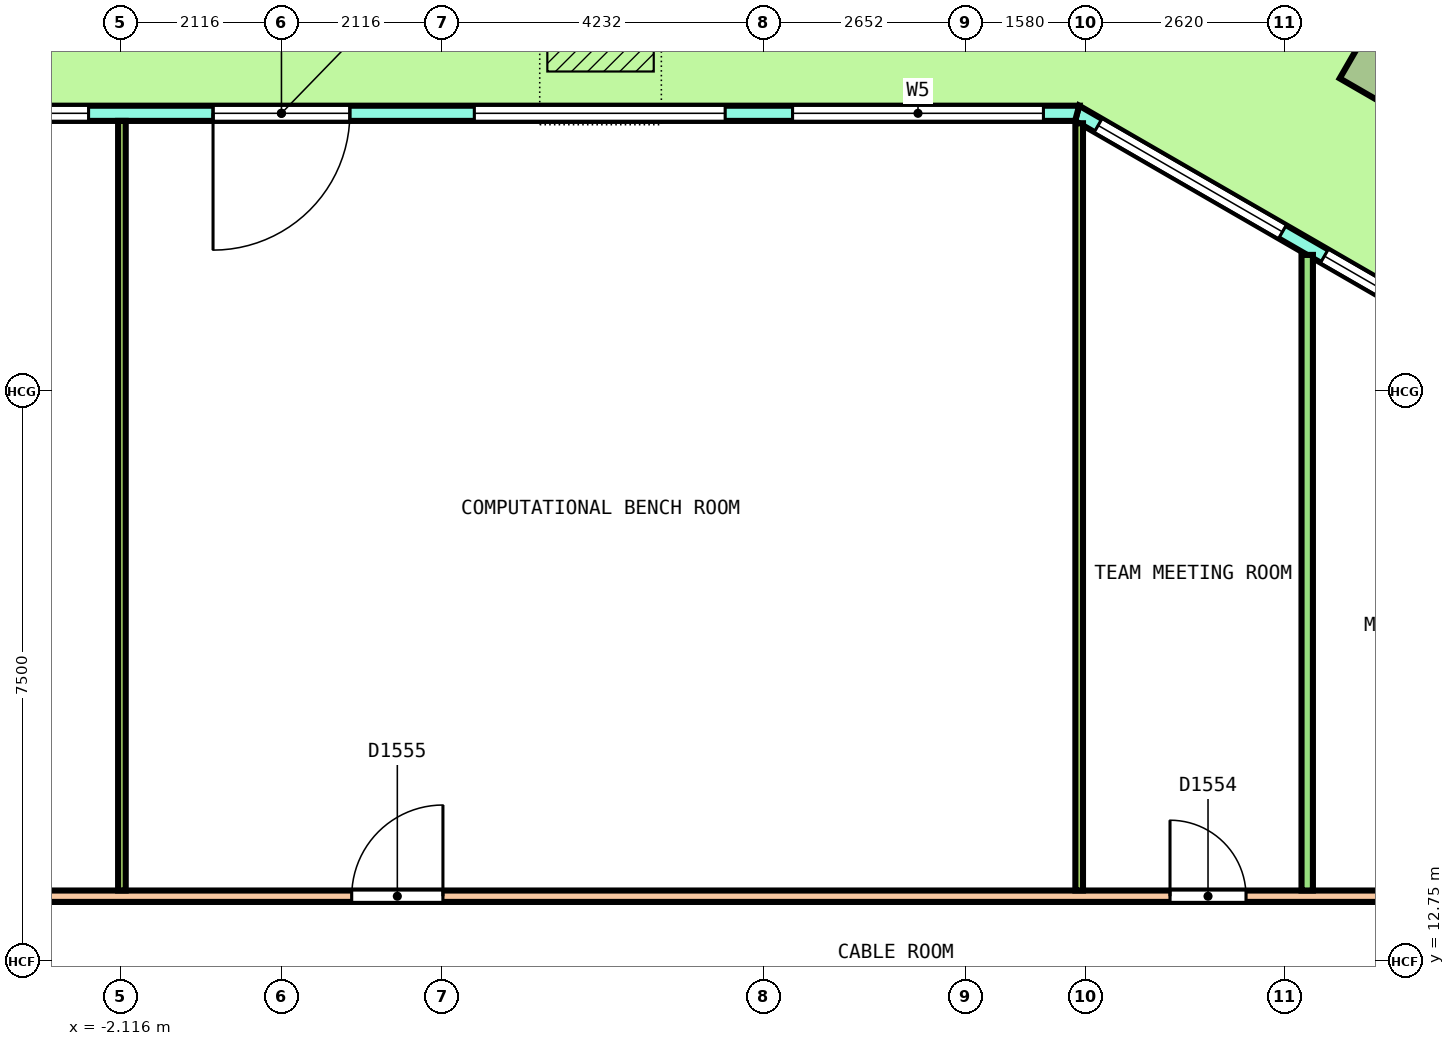
"""IFC4 building model, lengths in metres.
Left out: names, types, materials, properties, quantities, classifications, styles, units other than length and angle.
Written with IfcOpenShell. Run it as: python <this file> out.ifc"""

import sys

from ifc_helpers import new_model, si_unit, direction, frame, frame_2d, origin, origin_2d, place, context, subcontext, project, spatial, polyline, rectangle, outline, extrude, element, fill, save


model = new_model("IFC4")
c1 = context("Model", 3, precision=1e-05, world=origin(), true_north=direction((0.0, 1.0)))
c2 = subcontext(c1, "Body", "Model", "MODEL_VIEW")
j1 = project(units=[si_unit("LENGTHUNIT", "METRE"), si_unit("PLANEANGLEUNIT", "RADIAN")], contexts=[c1])
p1 = place(None, origin())
s1 = spatial("IfcSite", under=j1, at=p1, CompositionType="ELEMENT")
p2 = place(p1, origin())
s2 = spatial("IfcBuilding", under=s1, at=p2, CompositionType="ELEMENT")
p3 = place(p2, frame((0.0, 0.0, 98.4)))
s3 = spatial("IfcBuildingStorey", under=s2, at=p3, CompositionType="ELEMENT", Elevation=98.4)
p4 = place(p3, frame((14.845, 24.606, 0.0), z_axis=(0.036205074038, 0.0, 0.999344381389), x_axis=(-0.865315435316, 0.500246354177, 0.031349362627)))
e1 = element("IfcColumn", 1, at=p4, inside=s3, PredefinedType="COLUMN", context=c2, shape_type="SweptSolid", body=[
    extrude(rectangle(XDim=1.35, YDim=1.35, at=origin_2d()), origin(), (0.0, 0.0, 1.0), 4.053),
])
p5 = place(p3, frame((16.422, 20.463, 0.0), z_axis=(0.0, 0.0, 1.0), x_axis=(-0.866029458321, 0.49999297727, 0.0)))
e2 = element("IfcWall", 2, at=p5, inside=s3, PredefinedType="SOLIDWALL", context=c2, shape_type="SweptSolid", body=[
    extrude(outline(polyline([(-0.027, -0.1), (1.128, -0.1), (2.282, -0.1), (3.437, -0.1), (4.592, -0.1), (5.747, -0.1), (6.901, -0.1), (6.848, 0.1), (5.711, 0.1), (4.574, 0.1), (3.437, 0.1), (2.301, 0.1), (1.164, 0.1), (0.027, 0.1), (-0.027, -0.1)])), origin(), (0.0, 0.0, 1.0), 4.1),
])
p6 = place(p5, frame((0.319, 0.0, 0.1)))
e3 = element("IfcOpeningElement", 3, at=p6, cuts=e2, PredefinedType="OPENING", context=c2, shape_type="SweptSolid", body=[
    extrude(rectangle(XDim=2.8, YDim=2.9, at=frame_2d((1.4, 1.45))), frame((0.0, 0.11, 0.0), z_axis=(0.0, -1.0, 0.0), x_axis=(1.0, 0.0, 0.0)), (0.0, 0.0, 1.0), 0.22),
])
p7 = place(p5, frame((3.756, 0.0, 0.1)))
e4 = element("IfcOpeningElement", 4, at=p7, cuts=e2, PredefinedType="OPENING", context=c2, shape_type="SweptSolid", body=[
    extrude(rectangle(XDim=2.8, YDim=2.9, at=frame_2d((1.4, 1.45))), frame((0.0, 0.11, 0.0), z_axis=(0.0, -1.0, 0.0), x_axis=(1.0, 0.0, 0.0)), (0.0, 0.0, 1.0), 0.22),
])
p8 = place(p3, frame((10.468, 23.9, 0.0), z_axis=(0.0, 0.0, 1.0), x_axis=(-1.0, 0.0, 0.0)))
e5 = element("IfcWall", 5, at=p8, inside=s3, PredefinedType="SOLIDWALL", context=c2, shape_type="SweptSolid", body=[
    extrude(outline(polyline([(-0.027, -0.1), (1.023, -0.1), (2.072, -0.1), (3.122, -0.1), (4.171, -0.1), (5.221, -0.1), (6.27, -0.1), (7.32, -0.1), (8.369, -0.1), (9.419, -0.1), (10.468, -0.1), (11.518, -0.1), (12.567, -0.1), (13.617, -0.1), (14.666, -0.1), (15.716, -0.1), (16.765, -0.1), (17.815, -0.1), (18.864, -0.1), (19.914, -0.1), (20.963, -0.1), (20.91, 0.1), (19.865, 0.1), (18.821, 0.1), (17.777, 0.1), (16.733, 0.1), (15.689, 0.1), (14.645, 0.1), (13.601, 0.1), (12.557, 0.1), (11.512, 0.1), (10.468, 0.1), (9.424, 0.1), (8.38, 0.1), (7.336, 0.1), (6.292, 0.1), (5.248, 0.1), (4.203, 0.1), (3.159, 0.1), (2.115, 0.1), (1.071, 0.1), (0.027, 0.1), (-0.027, -0.1)])), origin(), (0.0, 0.0, 1.0), 4.1),
])
p9 = place(p8, frame((0.444, 0.0, 0.1)))
e6 = element("IfcOpeningElement", 6, at=p9, cuts=e5, PredefinedType="OPENING", context=c2, shape_type="SweptSolid", body=[
    extrude(rectangle(XDim=3.3, YDim=2.9, at=frame_2d((1.65, 1.45))), frame((0.0, 0.11, 0.0), z_axis=(0.0, -1.0, 0.0), x_axis=(1.0, 0.0, 0.0)), (0.0, 0.0, 1.0), 0.22),
])
p10 = place(p8, frame((4.631, 0.0, 0.1)))
e7 = element("IfcOpeningElement", 7, at=p10, cuts=e5, PredefinedType="OPENING", context=c2, shape_type="SweptSolid", body=[
    extrude(rectangle(XDim=3.3, YDim=2.9, at=frame_2d((1.65, 1.45))), frame((0.0, 0.11, 0.0), z_axis=(0.0, -1.0, 0.0), x_axis=(1.0, 0.0, 0.0)), (0.0, 0.0, 1.0), 0.22),
])
p11 = place(p8, frame((9.568, 0.0, 0.0)))
e8 = element("IfcOpeningElement", 8, at=p11, cuts=e5, PredefinedType="OPENING", context=c2, shape_type="SweptSolid", body=[
    extrude(rectangle(XDim=1.8, YDim=2.4, at=frame_2d((0.9, 1.2))), frame((0.0, 0.11, 0.0), z_axis=(0.0, -1.0, 0.0), x_axis=(1.0, 0.0, 0.0)), (0.0, 0.0, 1.0), 0.22),
])
p12 = place(p8, frame((9.568, 0.0, 2.55)))
e9 = element("IfcOpeningElement", 9, at=p12, cuts=e5, PredefinedType="OPENING", context=c2, shape_type="SweptSolid", body=[
    extrude(rectangle(XDim=1.8, YDim=0.45, at=frame_2d((0.9, 0.225))), frame((0.0, 0.11, 0.0), z_axis=(0.0, -1.0, 0.0), x_axis=(1.0, 0.0, 0.0)), (0.0, 0.0, 1.0), 0.22),
])
p13 = place(p8, frame((13.006, 0.0, 0.1)))
e10 = element("IfcOpeningElement", 10, at=p13, cuts=e5, PredefinedType="OPENING", context=c2, shape_type="SweptSolid", body=[
    extrude(rectangle(XDim=3.3, YDim=2.9, at=frame_2d((1.65, 1.45))), frame((0.0, 0.11, 0.0), z_axis=(0.0, -1.0, 0.0), x_axis=(1.0, 0.0, 0.0)), (0.0, 0.0, 1.0), 0.22),
])
p14 = place(p8, frame((17.193, 0.0, 0.1)))
e11 = element("IfcOpeningElement", 11, at=p14, cuts=e5, PredefinedType="OPENING", context=c2, shape_type="SweptSolid", body=[
    extrude(rectangle(XDim=3.3, YDim=2.9, at=frame_2d((1.65, 1.45))), frame((0.0, 0.11, 0.0), z_axis=(0.0, -1.0, 0.0), x_axis=(1.0, 0.0, 0.0)), (0.0, 0.0, 1.0), 0.22),
])
p15 = place(p3, frame((-15.925, 13.6, 0.0), z_axis=(0.0, 0.0, 1.0), x_axis=(1.0, 0.0, 0.0)))
e12 = element("IfcWall", 12, at=p15, inside=s3, PredefinedType="PARTITIONING", context=c2, shape_type="SweptSolid", body=[
    extrude(rectangle(XDim=31.85, YDim=0.15, at=frame_2d((15.925, 0.0))), origin(), (0.0, 0.0, 1.0), 3.05),
])
p16 = place(p15, frame((30.374, 0.0, 0.0)))
e13 = element("IfcOpeningElement", 13, at=p16, cuts=e12, PredefinedType="OPENING", context=c2, shape_type="SweptSolid", body=[
    extrude(rectangle(XDim=1.0, YDim=2.1, at=frame_2d((0.5, 1.05))), frame((0.0, 0.085, 0.0), z_axis=(0.0, -1.0, 0.0), x_axis=(1.0, 0.0, 0.0)), (0.0, 0.0, 1.0), 0.17),
])
p17 = place(p15, frame((27.615, 0.0, 0.0)))
e14 = element("IfcOpeningElement", 14, at=p17, cuts=e12, PredefinedType="OPENING", context=c2, shape_type="SweptSolid", body=[
    extrude(rectangle(XDim=1.0, YDim=2.1, at=frame_2d((0.5, 1.05))), frame((0.0, 0.085, 0.0), z_axis=(0.0, -1.0, 0.0), x_axis=(1.0, 0.0, 0.0)), (0.0, 0.0, 1.0), 0.17),
])
p18 = place(p15, frame((16.85, 0.0, 0.0)))
e15 = element("IfcOpeningElement", 15, at=p18, cuts=e12, PredefinedType="OPENING", context=c2, shape_type="SweptSolid", body=[
    extrude(rectangle(XDim=1.2, YDim=2.1, at=frame_2d((0.6, 1.05))), frame((0.0, 0.085, 0.0), z_axis=(0.0, -1.0, 0.0), x_axis=(1.0, 0.0, 0.0)), (0.0, 0.0, 1.0), 0.17),
])
p19 = place(p15, frame((10.802, 0.0, 0.0)))
e16 = element("IfcOpeningElement", 16, at=p19, cuts=e12, PredefinedType="OPENING", context=c2, shape_type="SweptSolid", body=[
    extrude(rectangle(XDim=1.0, YDim=2.1, at=frame_2d((0.5, 1.05))), frame((0.0, 0.085, 0.0), z_axis=(0.0, -1.0, 0.0), x_axis=(1.0, 0.0, 0.0)), (0.0, 0.0, 1.0), 0.17),
])
p20 = place(p15, frame((3.235, 0.0, 0.0)))
e17 = element("IfcOpeningElement", 17, at=p20, cuts=e12, PredefinedType="OPENING", context=c2, shape_type="SweptSolid", body=[
    extrude(rectangle(XDim=1.0, YDim=2.1, at=frame_2d((0.5, 1.05))), frame((0.0, 0.085, 0.0), z_axis=(0.0, -1.0, 0.0), x_axis=(1.0, 0.0, 0.0)), (0.0, 0.0, 1.0), 0.17),
])
p21 = place(p15, frame((0.879, 0.0, 0.0)))
e18 = element("IfcOpeningElement", 18, at=p21, cuts=e12, PredefinedType="OPENING", context=c2, shape_type="SweptSolid", body=[
    extrude(rectangle(XDim=1.0, YDim=2.1, at=frame_2d((0.5, 1.05))), frame((0.0, 0.085, 0.0), z_axis=(0.0, -1.0, 0.0), x_axis=(1.0, 0.0, 0.0)), (0.0, 0.0, 1.0), 0.17),
])
p22 = place(p3, frame((13.495, 13.675, 0.0), z_axis=(0.0, 0.0, 1.0), x_axis=(0.0, 1.0, 0.0)))
e19 = element("IfcWall", 19, at=p22, inside=s3, PredefinedType="PARTITIONING", context=c2, shape_type="SweptSolid", body=[
    extrude(rectangle(XDim=8.362, YDim=0.15, at=frame_2d((4.181, 0.0))), origin(), (0.0, 0.0, 1.0), 3.05),
])
p23 = place(p3, frame((10.495, 13.675, 0.0), z_axis=(0.0, 0.0, 1.0), x_axis=(0.0, 1.0, 0.0)))
e20 = element("IfcWall", 20, at=p23, inside=s3, PredefinedType="PARTITIONING", context=c2, shape_type="SweptSolid", body=[
    extrude(rectangle(XDim=10.094, YDim=0.1, at=frame_2d((5.047, 0.0))), origin(), (0.0, 0.0, 1.0), 3.05),
])
p24 = place(p3, frame((-2.099, 13.675, 0.0), z_axis=(0.0, 0.0, 1.0), x_axis=(0.0, 1.0, 0.0)))
e21 = element("IfcWall", 21, at=p24, inside=s3, PredefinedType="PARTITIONING", context=c2, shape_type="SweptSolid", body=[
    extrude(rectangle(XDim=10.125, YDim=0.1, at=frame_2d((5.062, 0.0))), origin(), (0.0, 0.0, 1.0), 3.05),
])
p25 = place(p6, origin())
e22 = element("IfcWindow", 22, at=p25, inside=s3, PartitioningType="SINGLE_PANEL", PredefinedType="WINDOW", context=c2, shape_type="SweptSolid", body=[
    extrude(rectangle(XDim=2.8, YDim=2.9, at=frame_2d((1.4, 1.45))), frame((0.0, 0.03, 0.0), z_axis=(0.0, -1.0, 0.0), x_axis=(1.0, 0.0, 0.0)), (0.0, 0.0, 1.0), 0.06),
])
fill(e3, e22)
p26 = place(p7, origin())
e23 = element("IfcWindow", 23, at=p26, inside=s3, PartitioningType="SINGLE_PANEL", PredefinedType="WINDOW", context=c2, shape_type="SweptSolid", body=[
    extrude(rectangle(XDim=2.8, YDim=2.9, at=frame_2d((1.4, 1.45))), frame((0.0, 0.03, 0.0), z_axis=(0.0, -1.0, 0.0), x_axis=(1.0, 0.0, 0.0)), (0.0, 0.0, 1.0), 0.06),
])
fill(e4, e23)
p27 = place(p9, origin())
e24 = element("IfcWindow", 24, at=p27, inside=s3, PartitioningType="SINGLE_PANEL", PredefinedType="WINDOW", context=c2, shape_type="SweptSolid", body=[
    extrude(rectangle(XDim=3.3, YDim=2.9, at=frame_2d((1.65, 1.45))), frame((0.0, 0.03, 0.0), z_axis=(0.0, -1.0, 0.0), x_axis=(1.0, 0.0, 0.0)), (0.0, 0.0, 1.0), 0.06),
])
fill(e6, e24)
p28 = place(p10, origin())
e25 = element("IfcWindow", 25, at=p28, inside=s3, PartitioningType="SINGLE_PANEL", PredefinedType="WINDOW", context=c2, shape_type="SweptSolid", body=[
    extrude(rectangle(XDim=3.3, YDim=2.9, at=frame_2d((1.65, 1.45))), frame((0.0, 0.03, 0.0), z_axis=(0.0, -1.0, 0.0), x_axis=(1.0, 0.0, 0.0)), (0.0, 0.0, 1.0), 0.06),
])
fill(e7, e25)
p29 = place(p11, origin())
e26 = element("IfcDoor", 26, at=p29, inside=s3, OperationType="DOUBLE_DOOR_SINGLE_SWING", PredefinedType="DOOR", context=c2, shape_type="SweptSolid", body=[
    extrude(rectangle(XDim=1.8, YDim=2.4, at=frame_2d((0.9, 1.2))), frame((0.0, 0.025, 0.0), z_axis=(0.0, -1.0, 0.0), x_axis=(1.0, 0.0, 0.0)), (0.0, 0.0, 1.0), 0.05),
])
fill(e8, e26)
p30 = place(p12, origin())
e27 = element("IfcWindow", 27, at=p30, inside=s3, PartitioningType="SINGLE_PANEL", PredefinedType="WINDOW", context=c2, shape_type="SweptSolid", body=[
    extrude(rectangle(XDim=1.8, YDim=0.45, at=frame_2d((0.9, 0.225))), frame((0.0, 0.03, 0.0), z_axis=(0.0, -1.0, 0.0), x_axis=(1.0, 0.0, 0.0)), (0.0, 0.0, 1.0), 0.06),
])
fill(e9, e27)
p31 = place(p13, origin())
e28 = element("IfcWindow", 28, at=p31, inside=s3, PartitioningType="SINGLE_PANEL", PredefinedType="WINDOW", context=c2, shape_type="SweptSolid", body=[
    extrude(rectangle(XDim=3.3, YDim=2.9, at=frame_2d((1.65, 1.45))), frame((0.0, 0.03, 0.0), z_axis=(0.0, -1.0, 0.0), x_axis=(1.0, 0.0, 0.0)), (0.0, 0.0, 1.0), 0.06),
])
fill(e10, e28)
p32 = place(p17, origin())
e29 = element("IfcDoor", 29, at=p32, inside=s3, OperationType="SINGLE_SWING_RIGHT", PredefinedType="DOOR", context=c2, shape_type="SweptSolid", body=[
    extrude(rectangle(XDim=1.0, YDim=2.1, at=frame_2d((0.5, 1.05))), frame((0.0, 0.025, 0.0), z_axis=(0.0, -1.0, 0.0), x_axis=(1.0, 0.0, 0.0)), (0.0, 0.0, 1.0), 0.05),
])
fill(e14, e29)
p33 = place(p18, origin())
e30 = element("IfcDoor", 30, at=p33, inside=s3, OperationType="DOUBLE_DOOR_SINGLE_SWING", PredefinedType="DOOR", context=c2, shape_type="SweptSolid", body=[
    extrude(rectangle(XDim=1.2, YDim=2.1, at=frame_2d((0.6, 1.05))), frame((0.0, 0.025, 0.0), z_axis=(0.0, -1.0, 0.0), x_axis=(1.0, 0.0, 0.0)), (0.0, 0.0, 1.0), 0.05),
])
fill(e15, e30)
save(model, sys.argv[1])
